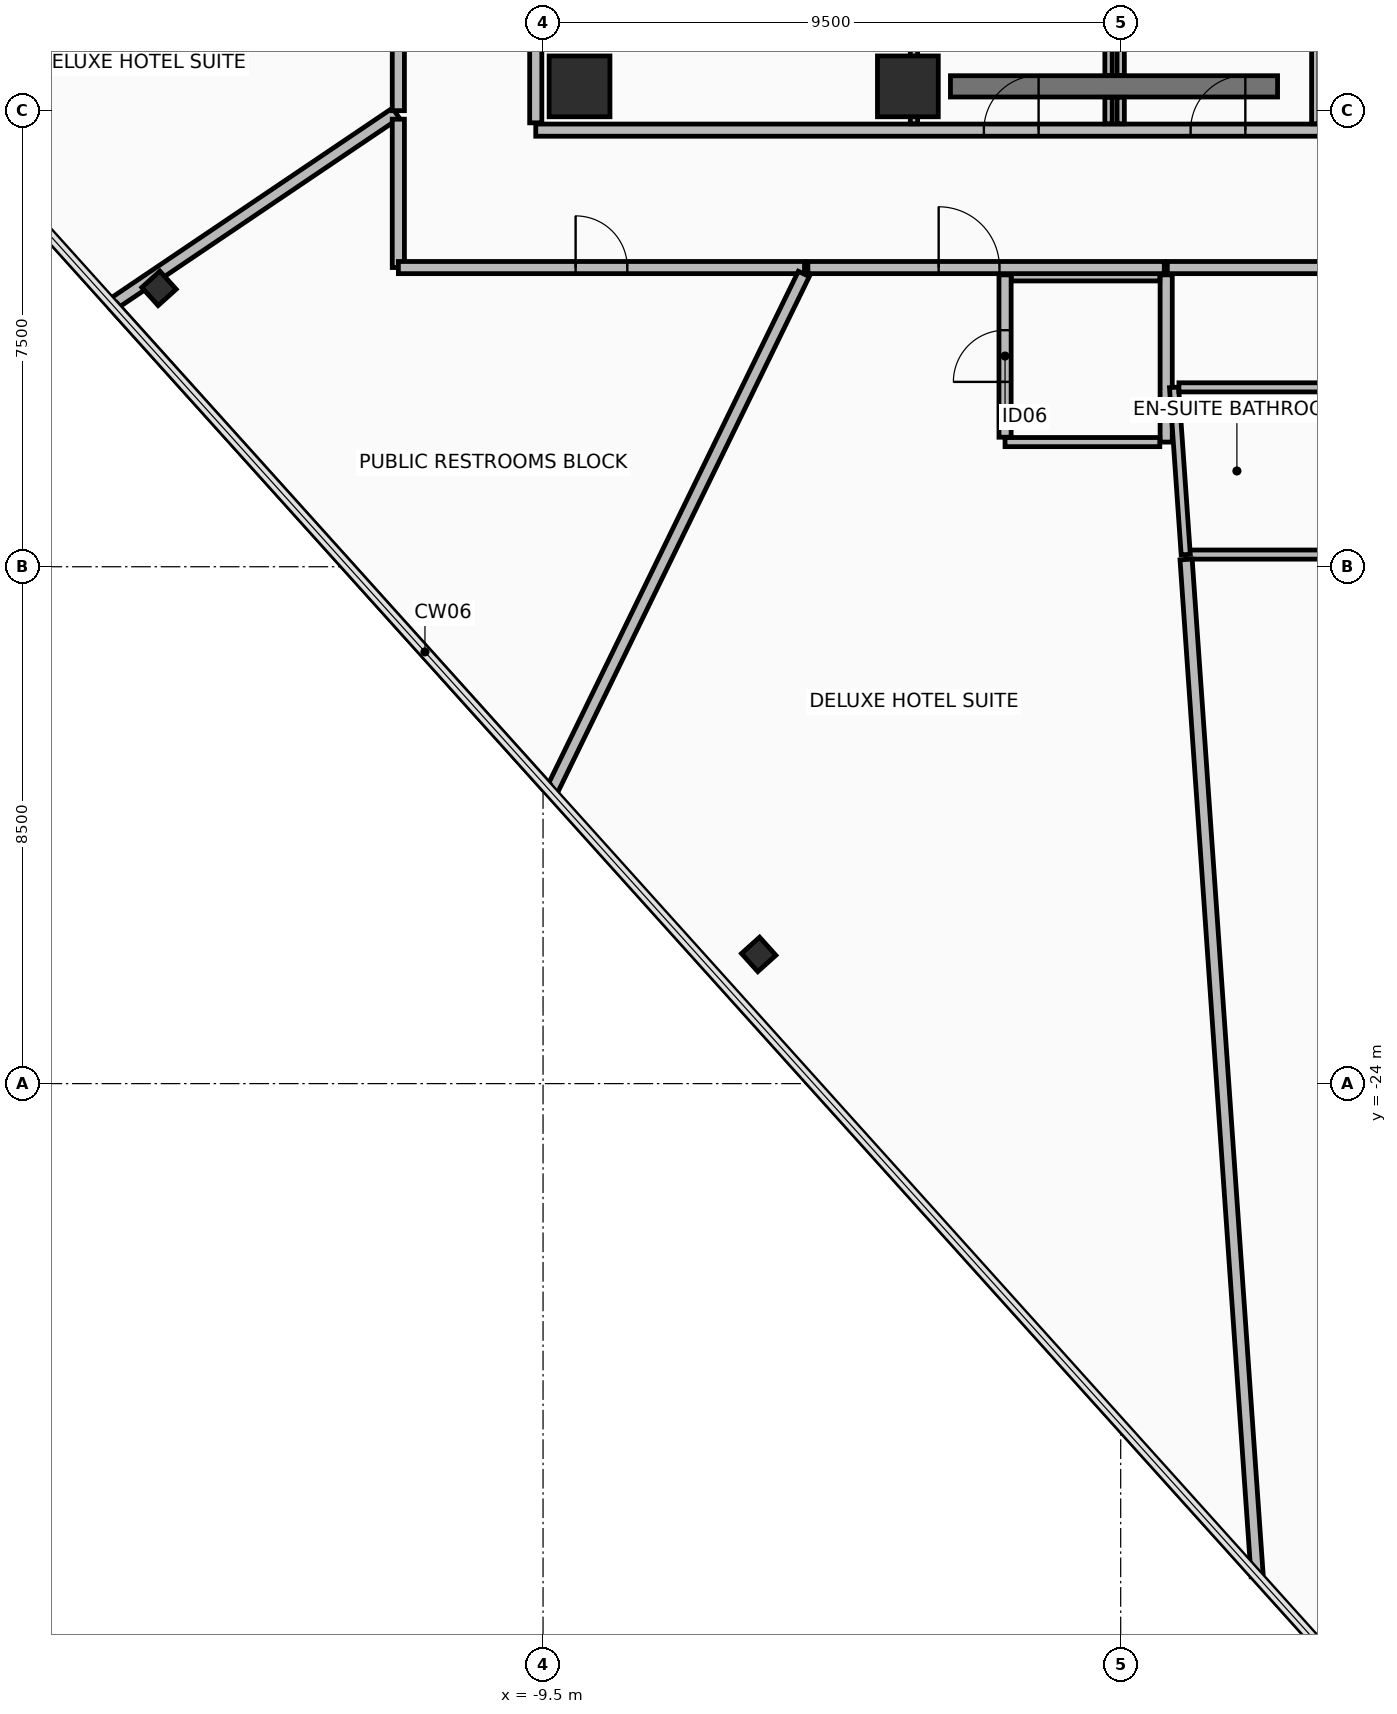
"""IFC4 building model, lengths in metres.
Left out: names, types, materials, properties, quantities, classifications, styles, units other than length and angle.
Written with IfcOpenShell. Run it as: python <this file> out.ifc"""

import sys

from ifc_helpers import new_model, si_unit, direction, frame, frame_2d, origin, origin_2d, place, context, subcontext, project, spatial, rectangle, hollow_rectangle, extrude, element, fill, save


model = new_model("IFC4")
c1 = context("Model", 3, precision=1e-05, world=origin(), true_north=direction((0.0, 1.0)))
c2 = subcontext(c1, "Body", "Model", "MODEL_VIEW")
j1 = project(units=[si_unit("LENGTHUNIT", "METRE"), si_unit("PLANEANGLEUNIT", "RADIAN")], contexts=[c1])
p1 = place(None, origin())
s1 = spatial("IfcSite", under=j1, at=p1, CompositionType="ELEMENT")
p2 = place(p1, origin())
s2 = spatial("IfcBuilding", under=s1, at=p2, CompositionType="ELEMENT")
p3 = place(p2, frame((0.0, 0.0, 287.05)))
s3 = spatial("IfcBuildingStorey", under=s2, at=p3, CompositionType="ELEMENT", Elevation=287.05)
for number, where, z_axis, x_axis in (
    (1, (-8.9, -7.6, 0.0), (0.0, 0.0, 1.0), (1.0, 0.0, 0.0)),
    (2, (-3.5, -7.6, 0.0), (0.0, 0.0, 1.0), (1.0, 0.0, 0.0)),
):
    element("IfcColumn", number, at=place(p3, frame(where, z_axis=z_axis, x_axis=x_axis)), inside=s3, PredefinedType="COLUMN", context=c2, shape_type="SweptSolid", body=[
        extrude(rectangle(XDim=1.0, YDim=1.0, at=origin_2d()), origin(), (0.0, 0.0, 1.0), 3.65),
    ])
for number, where, z_axis, x_axis in (
    (3, (-15.816, -10.922, 0.0), (0.0, 0.0, 1.0), (-0.669, 0.743, 0.0)),
    (4, (-5.954, -21.875, 0.0), (0.0, 0.0, 1.0), (-0.669, 0.743, 0.0)),
):
    element("IfcColumn", number, at=place(p3, frame(where, z_axis=z_axis, x_axis=x_axis)), inside=s3, PredefinedType="COLUMN", context=c2, shape_type="SweptSolid", body=[
        extrude(hollow_rectangle(XDim=0.4, YDim=0.4, WallThickness=0.025, at=origin_2d()), origin(), (0.0, 0.0, 1.0), 3.65),
    ])
p4 = place(p3, frame((-2.8, -7.6, 0.0), z_axis=(0.0, 0.0, 1.0), x_axis=(1.0, 0.0, 0.0)))
e5 = element("IfcWall", 5, at=p4, inside=s3, PredefinedType="SHEAR", context=c2, shape_type="SweptSolid", body=[
    extrude(rectangle(XDim=5.38, YDim=0.35, at=frame_2d((2.69, 0.0))), origin(), (0.0, 0.0, 1.0), 3.465),
])
p5 = place(p3, frame((-9.62, -8.32, 0.0), z_axis=(0.0, 0.0, 1.0), x_axis=(1.0, 0.0, 0.0)))
e6 = element("IfcWall", 6, at=p5, inside=s3, PredefinedType="PARTITIONING", context=c2, shape_type="SweptSolid", body=[
    extrude(rectangle(XDim=19.24, YDim=0.2, at=frame_2d((9.62, 0.0))), origin(), (0.0, 0.0, 1.0), 2.96),
])
p6 = place(p5, frame((7.37, 0.0, 0.0)))
e7 = element("IfcOpeningElement", 7, at=p6, cuts=e6, PredefinedType="OPENING", context=c2, shape_type="SweptSolid", body=[
    extrude(rectangle(XDim=0.9, YDim=2.1, at=frame_2d((0.45, 1.05))), frame((0.0, 0.11, 0.0), z_axis=(0.0, -1.0, 0.0), x_axis=(1.0, 0.0, 0.0)), (0.0, 0.0, 1.0), 0.22),
])
p7 = place(p5, frame((10.77, 0.0, 0.0)))
e8 = element("IfcOpeningElement", 8, at=p7, cuts=e6, PredefinedType="OPENING", context=c2, shape_type="SweptSolid", body=[
    extrude(rectangle(XDim=0.9, YDim=2.1, at=frame_2d((0.45, 1.05))), frame((0.0, 0.11, 0.0), z_axis=(0.0, -1.0, 0.0), x_axis=(1.0, 0.0, 0.0)), (0.0, 0.0, 1.0), 0.22),
])
p8 = place(p3, frame((-9.62, 8.2, 0.0), z_axis=(0.0, 0.0, 1.0), x_axis=(0.0, -1.0, 0.0)))
e9 = element("IfcWall", 9, at=p8, inside=s3, PredefinedType="PARTITIONING", context=c2, shape_type="SweptSolid", body=[
    extrude(rectangle(XDim=16.4, YDim=0.2, at=frame_2d((8.2, 0.0))), origin(), (0.0, 0.0, 1.0), 2.81),
])
p9 = place(p8, frame((12.65, 0.0, 0.0)))
e10 = element("IfcOpeningElement", 10, at=p9, cuts=e9, PredefinedType="OPENING", context=c2, shape_type="SweptSolid", body=[
    extrude(rectangle(XDim=1.1, YDim=2.15, at=frame_2d((0.55, 1.075))), frame((0.0, 0.11, 0.0), z_axis=(0.0, -1.0, 0.0), x_axis=(1.0, 0.0, 0.0)), (0.0, 0.0, 1.0), 0.22),
])
p10 = place(p3, frame((-0.2, -8.215, 0.0), z_axis=(0.0, 0.0, 1.0), x_axis=(0.0, 1.0, 0.0)))
e11 = element("IfcWall", 11, at=p10, inside=s3, PredefinedType="PARTITIONING", context=c2, shape_type="SweptSolid", body=[
    extrude(rectangle(XDim=0.435, YDim=0.12, at=frame_2d((0.218, 0.0))), origin(), (0.0, 0.0, 1.0), 2.76),
])
p11 = place(p3, frame((-0.2, -7.42, 0.0), z_axis=(0.0, 0.0, 1.0), x_axis=(0.0, 1.0, 0.0)))
e12 = element("IfcWall", 12, at=p11, inside=s3, PredefinedType="PARTITIONING", context=c2, shape_type="SweptSolid", body=[
    extrude(rectangle(XDim=2.07, YDim=0.12, at=frame_2d((1.035, 0.0))), origin(), (0.0, 0.0, 1.0), 2.76),
])
p12 = place(p3, frame((-3.4, -5.415, 0.0), z_axis=(0.0, 0.0, 1.0), x_axis=(0.0, -1.0, 0.0)))
e13 = element("IfcWall", 13, at=p12, inside=s3, PredefinedType="PARTITIONING", context=c2, shape_type="SweptSolid", body=[
    extrude(rectangle(XDim=2.8, YDim=0.12, at=frame_2d((1.4, 0.0))), origin(), (0.0, 0.0, 1.0), 2.76),
])
p13 = place(p3, frame((3.2, -8.215, 0.0), z_axis=(0.0, 0.0, 1.0), x_axis=(0.0, 1.0, 0.0)))
e14 = element("IfcWall", 14, at=p13, inside=s3, PredefinedType="PARTITIONING", context=c2, shape_type="SweptSolid", body=[
    extrude(rectangle(XDim=2.865, YDim=0.12, at=frame_2d((1.433, 0.0))), origin(), (0.0, 0.0, 1.0), 2.76),
])
p14 = place(p3, frame((0.0, -5.415, 0.0), z_axis=(0.0, 0.0, 1.0), x_axis=(0.0, -1.0, 0.0)))
e15 = element("IfcWall", 15, at=p14, inside=s3, PredefinedType="PARTITIONING", context=c2, shape_type="SweptSolid", body=[
    extrude(rectangle(XDim=2.005, YDim=0.12, at=frame_2d((1.002, 0.0))), origin(), (0.0, 0.0, 1.0), 2.76),
])
p15 = place(p3, frame((0.0, -7.78, 0.0), z_axis=(0.0, 0.0, 1.0), x_axis=(0.0, -1.0, 0.0)))
e16 = element("IfcWall", 16, at=p15, inside=s3, PredefinedType="PARTITIONING", context=c2, shape_type="SweptSolid", body=[
    extrude(rectangle(XDim=0.435, YDim=0.12, at=frame_2d((0.218, 0.0))), origin(), (0.0, 0.0, 1.0), 2.76),
])
p16 = place(p3, frame((0.748, -10.7, 0.0), z_axis=(0.0, 0.0, 1.0), x_axis=(0.0, -1.0, 0.0)))
e17 = element("IfcWall", 17, at=p16, inside=s3, PredefinedType="PARTITIONING", context=c2, shape_type="SweptSolid", body=[
    extrude(rectangle(XDim=2.75, YDim=0.2, at=frame_2d((1.375, 0.0))), origin(), (0.0, 0.0, 1.0), 3.465),
])
p17 = place(p3, frame((0.643, -13.45, 0.0), z_axis=(0.0, 0.0, 1.0), x_axis=(-1.0, 0.0, 0.0)))
e18 = element("IfcWall", 18, at=p17, inside=s3, PredefinedType="PARTITIONING", context=c2, shape_type="SweptSolid", body=[
    extrude(rectangle(XDim=2.545, YDim=0.15, at=frame_2d((1.272, 0.0))), origin(), (0.0, 0.0, 1.0), 3.465),
])
p18 = place(p3, frame((-1.902, -13.37, 0.0), z_axis=(0.0, 0.0, 1.0), x_axis=(0.0, 1.0, 0.0)))
e19 = element("IfcWall", 19, at=p18, inside=s3, PredefinedType="PARTITIONING", context=c2, shape_type="SweptSolid", body=[
    extrude(rectangle(XDim=2.67, YDim=0.2, at=frame_2d((1.335, 0.0))), origin(), (0.0, 0.0, 1.0), 3.465),
])
p19 = place(p18, frame((0.91, 0.0, 0.0)))
e20 = element("IfcOpeningElement", 20, at=p19, cuts=e19, PredefinedType="OPENING", context=c2, shape_type="SweptSolid", body=[
    extrude(rectangle(XDim=0.85, YDim=2.1, at=frame_2d((0.425, 1.05))), frame((0.0, 0.11, 0.0), z_axis=(0.0, -1.0, 0.0), x_axis=(1.0, 0.0, 0.0)), (0.0, 0.0, 1.0), 0.22),
])
p20 = place(p3, frame((-1.797, -10.7, 0.0), z_axis=(0.0, 0.0, 1.0), x_axis=(1.0, 0.0, 0.0)))
e21 = element("IfcWall", 21, at=p20, inside=s3, PredefinedType="PARTITIONING", context=c2, shape_type="SweptSolid", body=[
    extrude(rectangle(XDim=2.44, YDim=0.2, at=frame_2d((1.22, 0.0))), origin(), (0.0, 0.0, 1.0), 3.465),
])
p21 = place(p3, frame((3.318, -15.3, 0.0), z_axis=(0.0, 0.0, 1.0), x_axis=(-1.0, 0.0, 0.0)))
e22 = element("IfcWall", 22, at=p21, inside=s3, PredefinedType="PARTITIONING", context=c2, shape_type="SweptSolid", body=[
    extrude(rectangle(XDim=2.248, YDim=0.15, at=frame_2d((1.124, 0.0))), origin(), (0.0, 0.0, 1.0), 3.465),
])
p22 = place(p3, frame((1.07, -15.3, 0.0), z_axis=(0.0, 0.0, 1.0), x_axis=(-0.069698693715, 0.997568088952, 0.0)))
e23 = element("IfcWall", 23, at=p22, inside=s3, PredefinedType="PARTITIONING", context=c2, shape_type="SweptSolid", body=[
    extrude(rectangle(XDim=2.757, YDim=0.15, at=frame_2d((1.378, 0.0))), origin(), (0.0, 0.0, 1.0), 3.465),
])
p23 = place(p3, frame((0.958, -12.55, 0.0), z_axis=(0.0, 0.0, 1.0), x_axis=(1.0, 0.0, 0.0)))
e24 = element("IfcWall", 24, at=p23, inside=s3, PredefinedType="PARTITIONING", context=c2, shape_type="SweptSolid", body=[
    extrude(rectangle(XDim=2.36, YDim=0.15, at=frame_2d((1.18, 0.0))), origin(), (0.0, 0.0, 1.0), 3.465),
])
p24 = place(p3, frame((-16.562, -11.171, 0.0), z_axis=(0.0, 0.0, 1.0), x_axis=(0.829047221476, 0.559178598091, 0.0)))
e25 = element("IfcWall", 25, at=p24, inside=s3, PredefinedType="PARTITIONING", context=c2, shape_type="SweptSolid", body=[
    extrude(rectangle(XDim=5.601, YDim=0.2, at=frame_2d((2.8, 0.0))), origin(), (0.0, 0.0, 1.0), 2.81),
])
p25 = place(p3, frame((-11.88, -8.14, 0.0), z_axis=(0.0, 0.0, 1.0), x_axis=(0.0, -1.0, 0.0)))
e26 = element("IfcWall", 26, at=p25, inside=s3, PredefinedType="PARTITIONING", context=c2, shape_type="SweptSolid", body=[
    extrude(rectangle(XDim=2.439, YDim=0.2, at=frame_2d((1.22, 0.0))), origin(), (0.0, 0.0, 1.0), 2.96),
])
p26 = place(p3, frame((-11.879, -10.58, 0.0), z_axis=(0.0, 0.0, 1.0), x_axis=(1.0, 0.0, 0.0)))
e27 = element("IfcWall", 27, at=p26, inside=s3, PredefinedType="PARTITIONING", context=c2, shape_type="SweptSolid", body=[
    extrude(rectangle(XDim=6.679, YDim=0.2, at=frame_2d((3.34, 0.0))), origin(), (0.0, 0.0, 1.0), 3.22),
])
p27 = place(p26, frame((2.915, 0.0, 0.0)))
e28 = element("IfcOpeningElement", 28, at=p27, cuts=e27, PredefinedType="OPENING", context=c2, shape_type="SweptSolid", body=[
    extrude(rectangle(XDim=0.85, YDim=2.1, at=frame_2d((0.425, 1.05))), frame((0.0, 0.11, 0.0), z_axis=(0.0, -1.0, 0.0), x_axis=(1.0, 0.0, 0.0)), (0.0, 0.0, 1.0), 0.22),
])
p28 = place(p3, frame((-5.211, -10.685, 0.0), z_axis=(0.0, 0.0, 1.0), x_axis=(-0.438373396373, -0.8987929491, 0.0)))
e29 = element("IfcWall", 29, at=p28, inside=s3, PredefinedType="PARTITIONING", context=c2, shape_type="SweptSolid", body=[
    extrude(rectangle(XDim=9.479, YDim=0.2, at=frame_2d((4.74, 0.0))), origin(), (0.0, 0.0, 1.0), 2.81),
])
p29 = place(p3, frame((-9.443, -19.121, 0.0), z_axis=(0.0, 0.0, 1.0), x_axis=(-0.669126879752, 0.743148180912, 0.0)))
e30 = element("IfcWall", 30, at=p29, inside=s3, PredefinedType="PARTITIONING", context=c2, shape_type="SweptSolid", body=[
    extrude(rectangle(XDim=10.647, YDim=0.15, at=frame_2d((5.323, 0.0))), origin(), (0.0, 0.0, 1.0), 3.465),
])
p30 = place(p3, frame((-11.88, -0.857, 0.0), z_axis=(0.0, 0.0, 1.0), x_axis=(0.0, -1.0, 0.0)))
e31 = element("IfcWall", 31, at=p30, inside=s3, PredefinedType="PARTITIONING", context=c2, shape_type="SweptSolid", body=[
    extrude(rectangle(XDim=7.143, YDim=0.2, at=frame_2d((3.571, 0.0))), origin(), (0.0, 0.0, 1.0), 3.465),
])
p31 = place(p30, frame((3.071, 0.0, 0.0)))
e32 = element("IfcOpeningElement", 32, at=p31, cuts=e31, PredefinedType="OPENING", context=c2, shape_type="SweptSolid", body=[
    extrude(rectangle(XDim=1.0, YDim=2.15, at=frame_2d((0.5, 1.075))), frame((0.0, 0.11, 0.0), z_axis=(0.0, -1.0, 0.0), x_axis=(1.0, 0.0, 0.0)), (0.0, 0.0, 1.0), 0.22),
])
p32 = place(p3, frame((-5.145, -10.58, 0.0), z_axis=(0.0, 0.0, 1.0), x_axis=(1.0, 0.0, 0.0)))
e33 = element("IfcWall", 33, at=p32, inside=s3, PredefinedType="PARTITIONING", context=c2, shape_type="SweptSolid", body=[
    extrude(rectangle(XDim=5.861, YDim=0.2, at=frame_2d((2.931, 0.0))), origin(), (0.0, 0.0, 1.0), 2.96),
])
p33 = place(p32, frame((2.151, 0.0, 0.0)))
e34 = element("IfcOpeningElement", 34, at=p33, cuts=e33, PredefinedType="OPENING", context=c2, shape_type="SweptSolid", body=[
    extrude(rectangle(XDim=1.0, YDim=2.15, at=frame_2d((0.5, 1.075))), frame((0.0, 0.11, 0.0), z_axis=(0.0, -1.0, 0.0), x_axis=(1.0, 0.0, 0.0)), (0.0, 0.0, 1.0), 0.22),
])
p34 = place(p3, frame((1.075, -15.38, 0.0), z_axis=(0.0, 0.0, 1.0), x_axis=(0.069765789378, -0.997563398804, 0.0)))
e35 = element("IfcWall", 35, at=p34, inside=s3, PredefinedType="PARTITIONING", context=c2, shape_type="SweptSolid", body=[
    extrude(rectangle(XDim=16.762, YDim=0.2, at=frame_2d((8.381, 0.0))), origin(), (0.0, 0.0, 1.0), 2.81),
])
p35 = place(p3, frame((0.767, -10.58, 0.0), z_axis=(0.0, 0.0, 1.0), x_axis=(1.0, 0.0, 0.0)))
e36 = element("IfcWall", 36, at=p35, inside=s3, PredefinedType="PARTITIONING", context=c2, shape_type="SweptSolid", body=[
    extrude(rectangle(XDim=6.356, YDim=0.2, at=frame_2d((3.178, 0.0))), origin(), (0.0, 0.0, 1.0), 3.465),
])
p36 = place(p35, frame((2.678, 0.0, 0.0)))
e37 = element("IfcOpeningElement", 37, at=p36, cuts=e36, PredefinedType="OPENING", context=c2, shape_type="SweptSolid", body=[
    extrude(rectangle(XDim=1.0, YDim=2.15, at=frame_2d((0.5, 1.075))), frame((0.0, 0.11, 0.0), z_axis=(0.0, -1.0, 0.0), x_axis=(1.0, 0.0, 0.0)), (0.0, 0.0, 1.0), 0.22),
])
p37 = place(p6, frame((0.9, 0.0, 0.0), z_axis=(0.0, 0.0, 1.0), x_axis=(-1.0, 0.0, 0.0)))
e38 = element("IfcDoor", 38, at=p37, inside=s3, OperationType="SINGLE_SWING_LEFT", PredefinedType="DOOR", context=c2, shape_type="SweptSolid", body=[
    extrude(rectangle(XDim=0.9, YDim=2.1, at=frame_2d((0.45, 1.05))), frame((0.0, 0.025, 0.0), z_axis=(0.0, -1.0, 0.0), x_axis=(1.0, 0.0, 0.0)), (0.0, 0.0, 1.0), 0.05),
])
fill(e7, e38)
p38 = place(p7, frame((0.9, 0.0, 0.0), z_axis=(0.0, 0.0, 1.0), x_axis=(-1.0, 0.0, 0.0)))
e39 = element("IfcDoor", 39, at=p38, inside=s3, OperationType="SINGLE_SWING_LEFT", PredefinedType="DOOR", context=c2, shape_type="SweptSolid", body=[
    extrude(rectangle(XDim=0.9, YDim=2.1, at=frame_2d((0.45, 1.05))), frame((0.0, 0.025, 0.0), z_axis=(0.0, -1.0, 0.0), x_axis=(1.0, 0.0, 0.0)), (0.0, 0.0, 1.0), 0.05),
])
fill(e8, e39)
p39 = place(p19, origin())
e40 = element("IfcDoor", 40, at=p39, inside=s3, OperationType="SINGLE_SWING_RIGHT", PredefinedType="DOOR", context=c2, shape_type="SweptSolid", body=[
    extrude(rectangle(XDim=0.85, YDim=2.1, at=frame_2d((0.425, 1.05))), frame((0.0, 0.025, 0.0), z_axis=(0.0, -1.0, 0.0), x_axis=(1.0, 0.0, 0.0)), (0.0, 0.0, 1.0), 0.05),
])
fill(e20, e40)
p40 = place(p27, origin())
e41 = element("IfcDoor", 41, at=p40, inside=s3, OperationType="SINGLE_SWING_RIGHT", PredefinedType="DOOR", context=c2, shape_type="SweptSolid", body=[
    extrude(rectangle(XDim=0.85, YDim=2.1, at=frame_2d((0.425, 1.05))), frame((0.0, 0.025, 0.0), z_axis=(0.0, -1.0, 0.0), x_axis=(1.0, 0.0, 0.0)), (0.0, 0.0, 1.0), 0.05),
])
fill(e28, e41)
p41 = place(p33, origin())
e42 = element("IfcDoor", 42, at=p41, inside=s3, OperationType="SINGLE_SWING_LEFT", PredefinedType="DOOR", context=c2, shape_type="SweptSolid", body=[
    extrude(rectangle(XDim=1.0, YDim=2.15, at=frame_2d((0.5, 1.075))), frame((0.0, 0.025, 0.0), z_axis=(0.0, -1.0, 0.0), x_axis=(1.0, 0.0, 0.0)), (0.0, 0.0, 1.0), 0.05),
])
fill(e34, e42)
save(model, sys.argv[1])
